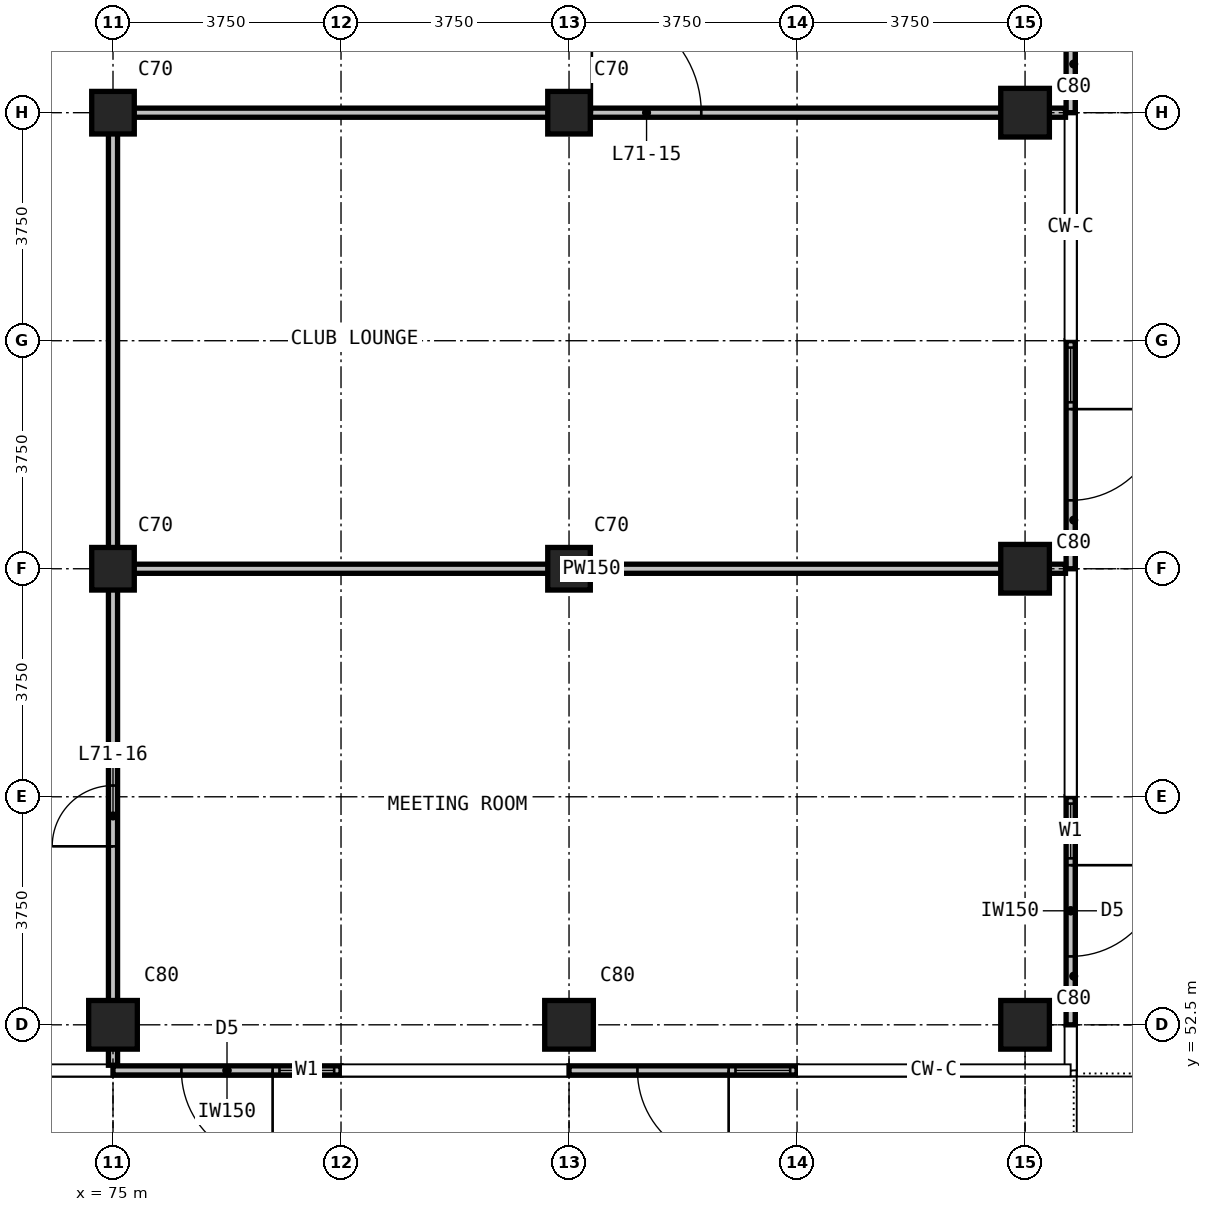
"""IFC4 building model, lengths in metres.
Left out: names, types, materials, properties, quantities, classifications, styles, units other than length and angle.
Written with IfcOpenShell. Run it as: python <this file> out.ifc"""

import sys

from ifc_helpers import new_model, si_unit, direction, frame, frame_2d, origin, origin_2d, place, context, subcontext, project, spatial, rectangle, extrude, element, fill, save


model = new_model("IFC4")
c1 = context("Model", 3, precision=1e-05, world=origin(), true_north=direction((0.0, 1.0)))
c2 = subcontext(c1, "Body", "Model", "MODEL_VIEW")
j1 = project(units=[si_unit("LENGTHUNIT", "METRE"), si_unit("PLANEANGLEUNIT", "RADIAN")], contexts=[c1])
p1 = place(None, origin())
s1 = spatial("IfcSite", under=j1, at=p1, CompositionType="ELEMENT")
p2 = place(p1, origin())
s2 = spatial("IfcBuilding", under=s1, at=p2, CompositionType="ELEMENT")
p3 = place(p2, frame((0.0, 0.0, 272.9)))
s3 = spatial("IfcBuildingStorey", under=s2, at=p3, CompositionType="ELEMENT", Elevation=272.9)
p4 = place(p3, frame((75.0, 52.5, 0.0), z_axis=(0.0, 0.0, 1.0), x_axis=(1.0, 0.0, 0.0)))
e1 = element("IfcColumn", 1, at=p4, inside=s3, PredefinedType="COLUMN", context=c2, shape_type="SweptSolid", body=[
    extrude(rectangle(XDim=0.8, YDim=0.8, at=origin_2d()), origin(), (0.0, 0.0, 1.0), 3.6),
])
for number, where, z_axis, x_axis in (
    (2, (75.0, 60.0, 0.0), (0.0, 0.0, 1.0), (1.0, 0.0, 0.0)),
    (3, (75.0, 67.5, 0.0), (0.0, 0.0, 1.0), (1.0, 0.0, 0.0)),
):
    element("IfcColumn", number, at=place(p3, frame(where, z_axis=z_axis, x_axis=x_axis)), inside=s3, PredefinedType="COLUMN", context=c2, shape_type="SweptSolid", body=[
        extrude(rectangle(XDim=0.7, YDim=0.7, at=origin_2d()), origin(), (0.0, 0.0, 1.0), 3.6),
    ])
p5 = place(p3, frame((82.5, 52.5, 0.0), z_axis=(0.0, 0.0, 1.0), x_axis=(1.0, 0.0, 0.0)))
e4 = element("IfcColumn", 4, at=p5, inside=s3, PredefinedType="COLUMN", context=c2, shape_type="SweptSolid", body=[
    extrude(rectangle(XDim=0.8, YDim=0.8, at=origin_2d()), origin(), (0.0, 0.0, 1.0), 3.6),
])
for number, where, z_axis, x_axis in (
    (5, (82.5, 60.0, 0.0), (0.0, 0.0, 1.0), (1.0, 0.0, 0.0)),
    (6, (82.5, 67.5, 0.0), (0.0, 0.0, 1.0), (1.0, 0.0, 0.0)),
):
    element("IfcColumn", number, at=place(p3, frame(where, z_axis=z_axis, x_axis=x_axis)), inside=s3, PredefinedType="COLUMN", context=c2, shape_type="SweptSolid", body=[
        extrude(rectangle(XDim=0.7, YDim=0.7, at=origin_2d()), origin(), (0.0, 0.0, 1.0), 3.6),
    ])
for number, where, z_axis, x_axis in (
    (7, (90.0, 52.5, 0.0), (0.0, 0.0, 1.0), (1.0, 0.0, 0.0)),
    (8, (90.0, 60.0, 0.0), (0.0, 0.0, 1.0), (1.0, 0.0, 0.0)),
    (9, (90.0, 67.5, 0.0), (0.0, 0.0, 1.0), (1.0, 0.0, 0.0)),
):
    element("IfcColumn", number, at=place(p3, frame(where, z_axis=z_axis, x_axis=x_axis)), inside=s3, PredefinedType="COLUMN", context=c2, shape_type="SweptSolid", body=[
        extrude(rectangle(XDim=0.8, YDim=0.8, at=origin_2d()), origin(), (0.0, 0.0, 1.0), 3.6),
    ])
p6 = place(p3, frame((90.75, 56.25, 0.0), z_axis=(0.0, 0.0, 1.0), x_axis=(0.0, -1.0, 0.0)))
e10 = element("IfcWall", 10, at=p6, inside=s3, PredefinedType="SOLIDWALL", context=c2, shape_type="SweptSolid", body=[
    extrude(rectangle(XDim=3.75, YDim=0.15, at=frame_2d((1.875, 0.0))), origin(), (0.0, 0.0, 1.0), 3.3),
])
p7 = place(p6, frame((0.113, 0.0, 0.1)))
e11 = element("IfcOpeningElement", 11, at=p7, cuts=e10, PredefinedType="OPENING", context=c2, shape_type="SweptSolid", body=[
    extrude(rectangle(XDim=0.9, YDim=2.4, at=frame_2d((0.45, 1.2))), frame((0.0, 0.085, 0.0), z_axis=(0.0, -1.0, 0.0), x_axis=(1.0, 0.0, 0.0)), (0.0, 0.0, 1.0), 0.17),
])
p8 = place(p6, frame((1.125, 0.0, 0.0)))
e12 = element("IfcOpeningElement", 12, at=p8, cuts=e10, PredefinedType="OPENING", context=c2, shape_type="SweptSolid", body=[
    extrude(rectangle(XDim=1.5, YDim=2.4, at=frame_2d((0.75, 1.2))), frame((0.0, 0.085, 0.0), z_axis=(0.0, -1.0, 0.0), x_axis=(1.0, 0.0, 0.0)), (0.0, 0.0, 1.0), 0.17),
])
p9 = place(p3, frame((90.75, 63.75, 0.0), z_axis=(0.0, 0.0, 1.0), x_axis=(0.0, -1.0, 0.0)))
e13 = element("IfcWall", 13, at=p9, inside=s3, PredefinedType="SOLIDWALL", context=c2, shape_type="SweptSolid", body=[
    extrude(rectangle(XDim=3.75, YDim=0.15, at=frame_2d((1.875, 0.0))), origin(), (0.0, 0.0, 1.0), 3.3),
])
p10 = place(p9, frame((0.113, 0.0, 0.1)))
e14 = element("IfcOpeningElement", 14, at=p10, cuts=e13, PredefinedType="OPENING", context=c2, shape_type="SweptSolid", body=[
    extrude(rectangle(XDim=0.9, YDim=2.4, at=frame_2d((0.45, 1.2))), frame((0.0, 0.085, 0.0), z_axis=(0.0, -1.0, 0.0), x_axis=(1.0, 0.0, 0.0)), (0.0, 0.0, 1.0), 0.17),
])
p11 = place(p9, frame((1.125, 0.0, 0.0)))
e15 = element("IfcOpeningElement", 15, at=p11, cuts=e13, PredefinedType="OPENING", context=c2, shape_type="SweptSolid", body=[
    extrude(rectangle(XDim=1.5, YDim=2.4, at=frame_2d((0.75, 1.2))), frame((0.0, 0.085, 0.0), z_axis=(0.0, -1.0, 0.0), x_axis=(1.0, 0.0, 0.0)), (0.0, 0.0, 1.0), 0.17),
])
p12 = place(p3, frame((90.75, 71.25, 0.0), z_axis=(0.0, 0.0, 1.0), x_axis=(0.0, -1.0, 0.0)))
e16 = element("IfcWall", 16, at=p12, inside=s3, PredefinedType="SOLIDWALL", context=c2, shape_type="SweptSolid", body=[
    extrude(rectangle(XDim=3.75, YDim=0.15, at=frame_2d((1.875, 0.0))), origin(), (0.0, 0.0, 1.0), 3.3),
])
p13 = place(p12, frame((0.113, 0.0, 0.1)))
e17 = element("IfcOpeningElement", 17, at=p13, cuts=e16, PredefinedType="OPENING", context=c2, shape_type="SweptSolid", body=[
    extrude(rectangle(XDim=0.9, YDim=2.4, at=frame_2d((0.45, 1.2))), frame((0.0, 0.085, 0.0), z_axis=(0.0, -1.0, 0.0), x_axis=(1.0, 0.0, 0.0)), (0.0, 0.0, 1.0), 0.17),
])
p14 = place(p12, frame((1.125, 0.0, 0.0)))
e18 = element("IfcOpeningElement", 18, at=p14, cuts=e16, PredefinedType="OPENING", context=c2, shape_type="SweptSolid", body=[
    extrude(rectangle(XDim=1.5, YDim=2.4, at=frame_2d((0.75, 1.2))), frame((0.0, 0.085, 0.0), z_axis=(0.0, -1.0, 0.0), x_axis=(1.0, 0.0, 0.0)), (0.0, 0.0, 1.0), 0.17),
])
p15 = place(p3, frame((78.75, 51.75, 0.0), z_axis=(0.0, 0.0, 1.0), x_axis=(-1.0, 0.0, 0.0)))
e19 = element("IfcWall", 19, at=p15, inside=s3, PredefinedType="SOLIDWALL", context=c2, shape_type="SweptSolid", body=[
    extrude(rectangle(XDim=3.75, YDim=0.15, at=frame_2d((1.875, 0.0))), origin(), (0.0, 0.0, 1.0), 3.3),
])
p16 = place(p15, frame((0.113, 0.0, 0.1)))
e20 = element("IfcOpeningElement", 20, at=p16, cuts=e19, PredefinedType="OPENING", context=c2, shape_type="SweptSolid", body=[
    extrude(rectangle(XDim=0.9, YDim=2.4, at=frame_2d((0.45, 1.2))), frame((0.0, 0.085, 0.0), z_axis=(0.0, -1.0, 0.0), x_axis=(1.0, 0.0, 0.0)), (0.0, 0.0, 1.0), 0.17),
])
p17 = place(p15, frame((1.125, 0.0, 0.0)))
e21 = element("IfcOpeningElement", 21, at=p17, cuts=e19, PredefinedType="OPENING", context=c2, shape_type="SweptSolid", body=[
    extrude(rectangle(XDim=1.5, YDim=2.4, at=frame_2d((0.75, 1.2))), frame((0.0, 0.085, 0.0), z_axis=(0.0, -1.0, 0.0), x_axis=(1.0, 0.0, 0.0)), (0.0, 0.0, 1.0), 0.17),
])
p18 = place(p3, frame((86.25, 51.75, 0.0), z_axis=(0.0, 0.0, 1.0), x_axis=(-1.0, 0.0, 0.0)))
e22 = element("IfcWall", 22, at=p18, inside=s3, PredefinedType="SOLIDWALL", context=c2, shape_type="SweptSolid", body=[
    extrude(rectangle(XDim=3.75, YDim=0.15, at=frame_2d((1.875, 0.0))), origin(), (0.0, 0.0, 1.0), 3.3),
])
p19 = place(p18, frame((0.113, 0.0, 0.1)))
e23 = element("IfcOpeningElement", 23, at=p19, cuts=e22, PredefinedType="OPENING", context=c2, shape_type="SweptSolid", body=[
    extrude(rectangle(XDim=0.9, YDim=2.4, at=frame_2d((0.45, 1.2))), frame((0.0, 0.085, 0.0), z_axis=(0.0, -1.0, 0.0), x_axis=(1.0, 0.0, 0.0)), (0.0, 0.0, 1.0), 0.17),
])
p20 = place(p18, frame((1.125, 0.0, 0.0)))
e24 = element("IfcOpeningElement", 24, at=p20, cuts=e22, PredefinedType="OPENING", context=c2, shape_type="SweptSolid", body=[
    extrude(rectangle(XDim=1.5, YDim=2.4, at=frame_2d((0.75, 1.2))), frame((0.0, 0.085, 0.0), z_axis=(0.0, -1.0, 0.0), x_axis=(1.0, 0.0, 0.0)), (0.0, 0.0, 1.0), 0.17),
])
p21 = place(p3, frame((75.075, 60.0, 0.0), z_axis=(0.0, 0.0, 1.0), x_axis=(1.0, 0.0, 0.0)))
e25 = element("IfcWall", 25, at=p21, inside=s3, PredefinedType="PARTITIONING", context=c2, shape_type="SweptSolid", body=[
    extrude(rectangle(XDim=15.59, YDim=0.15, at=frame_2d((7.795, 0.0))), origin(), (0.0, 0.0, 1.0), 3.3),
])
p22 = place(p3, frame((75.075, 67.5, 0.0), z_axis=(0.0, 0.0, 1.0), x_axis=(1.0, 0.0, 0.0)))
e26 = element("IfcWall", 26, at=p22, inside=s3, PredefinedType="PARTITIONING", context=c2, shape_type="SweptSolid", body=[
    extrude(rectangle(XDim=15.59, YDim=0.15, at=frame_2d((7.795, 0.0))), origin(), (0.0, 0.0, 1.0), 3.3),
])
p23 = place(p22, frame((7.8, 0.0, 0.0)))
e27 = element("IfcOpeningElement", 27, at=p23, cuts=e26, PredefinedType="OPENING", context=c2, shape_type="SweptSolid", body=[
    extrude(rectangle(XDim=1.8, YDim=2.2, at=frame_2d((0.9, 1.1))), frame((0.0, 0.085, 0.0), z_axis=(0.0, -1.0, 0.0), x_axis=(1.0, 0.0, 0.0)), (0.0, 0.0, 1.0), 0.17),
])
p24 = place(p3, frame((75.0, 51.835, 0.0), z_axis=(0.0, 0.0, 1.0), x_axis=(0.0, 1.0, 0.0)))
e28 = element("IfcWall", 28, at=p24, inside=s3, PredefinedType="PARTITIONING", context=c2, shape_type="SweptSolid", body=[
    extrude(rectangle(XDim=15.74, YDim=0.15, at=frame_2d((7.87, 0.0))), origin(), (0.0, 0.0, 1.0), 3.3),
])
p25 = place(p24, frame((3.6, 0.0, 0.0)))
e29 = element("IfcOpeningElement", 29, at=p25, cuts=e28, PredefinedType="OPENING", context=c2, shape_type="SweptSolid", body=[
    extrude(rectangle(XDim=1.0, YDim=2.2, at=frame_2d((0.5, 1.1))), frame((0.0, 0.085, 0.0), z_axis=(0.0, -1.0, 0.0), x_axis=(1.0, 0.0, 0.0)), (0.0, 0.0, 1.0), 0.17),
])
p26 = place(p7, origin())
e30 = element("IfcWindow", 30, at=p26, inside=s3, PartitioningType="SINGLE_PANEL", PredefinedType="WINDOW", context=c2, shape_type="SweptSolid", body=[
    extrude(rectangle(XDim=0.9, YDim=2.4, at=frame_2d((0.45, 1.2))), frame((0.0, 0.03, 0.0), z_axis=(0.0, -1.0, 0.0), x_axis=(1.0, 0.0, 0.0)), (0.0, 0.0, 1.0), 0.06),
])
fill(e11, e30)
p27 = place(p8, origin())
e31 = element("IfcDoor", 31, at=p27, inside=s3, OperationType="DOUBLE_DOOR_SINGLE_SWING", PredefinedType="DOOR", context=c2, shape_type="SweptSolid", body=[
    extrude(rectangle(XDim=1.5, YDim=2.4, at=frame_2d((0.75, 1.2))), frame((0.0, 0.025, 0.0), z_axis=(0.0, -1.0, 0.0), x_axis=(1.0, 0.0, 0.0)), (0.0, 0.0, 1.0), 0.05),
])
fill(e12, e31)
p28 = place(p10, origin())
e32 = element("IfcWindow", 32, at=p28, inside=s3, PartitioningType="SINGLE_PANEL", PredefinedType="WINDOW", context=c2, shape_type="SweptSolid", body=[
    extrude(rectangle(XDim=0.9, YDim=2.4, at=frame_2d((0.45, 1.2))), frame((0.0, 0.03, 0.0), z_axis=(0.0, -1.0, 0.0), x_axis=(1.0, 0.0, 0.0)), (0.0, 0.0, 1.0), 0.06),
])
fill(e14, e32)
p29 = place(p11, origin())
e33 = element("IfcDoor", 33, at=p29, inside=s3, OperationType="DOUBLE_DOOR_SINGLE_SWING", PredefinedType="DOOR", context=c2, shape_type="SweptSolid", body=[
    extrude(rectangle(XDim=1.5, YDim=2.4, at=frame_2d((0.75, 1.2))), frame((0.0, 0.025, 0.0), z_axis=(0.0, -1.0, 0.0), x_axis=(1.0, 0.0, 0.0)), (0.0, 0.0, 1.0), 0.05),
])
fill(e15, e33)
p30 = place(p16, origin())
e34 = element("IfcWindow", 34, at=p30, inside=s3, PartitioningType="SINGLE_PANEL", PredefinedType="WINDOW", context=c2, shape_type="SweptSolid", body=[
    extrude(rectangle(XDim=0.9, YDim=2.4, at=frame_2d((0.45, 1.2))), frame((0.0, 0.03, 0.0), z_axis=(0.0, -1.0, 0.0), x_axis=(1.0, 0.0, 0.0)), (0.0, 0.0, 1.0), 0.06),
])
fill(e20, e34)
p31 = place(p17, origin())
e35 = element("IfcDoor", 35, at=p31, inside=s3, OperationType="DOUBLE_DOOR_SINGLE_SWING", PredefinedType="DOOR", context=c2, shape_type="SweptSolid", body=[
    extrude(rectangle(XDim=1.5, YDim=2.4, at=frame_2d((0.75, 1.2))), frame((0.0, 0.025, 0.0), z_axis=(0.0, -1.0, 0.0), x_axis=(1.0, 0.0, 0.0)), (0.0, 0.0, 1.0), 0.05),
])
fill(e21, e35)
p32 = place(p19, origin())
e36 = element("IfcWindow", 36, at=p32, inside=s3, PartitioningType="SINGLE_PANEL", PredefinedType="WINDOW", context=c2, shape_type="SweptSolid", body=[
    extrude(rectangle(XDim=0.9, YDim=2.4, at=frame_2d((0.45, 1.2))), frame((0.0, 0.03, 0.0), z_axis=(0.0, -1.0, 0.0), x_axis=(1.0, 0.0, 0.0)), (0.0, 0.0, 1.0), 0.06),
])
fill(e23, e36)
p33 = place(p20, origin())
e37 = element("IfcDoor", 37, at=p33, inside=s3, OperationType="DOUBLE_DOOR_SINGLE_SWING", PredefinedType="DOOR", context=c2, shape_type="SweptSolid", body=[
    extrude(rectangle(XDim=1.5, YDim=2.4, at=frame_2d((0.75, 1.2))), frame((0.0, 0.025, 0.0), z_axis=(0.0, -1.0, 0.0), x_axis=(1.0, 0.0, 0.0)), (0.0, 0.0, 1.0), 0.05),
])
fill(e24, e37)
p34 = place(p23, origin())
e38 = element("IfcDoor", 38, at=p34, inside=s3, OperationType="DOUBLE_DOOR_SINGLE_SWING", PredefinedType="DOOR", context=c2, shape_type="SweptSolid", body=[
    extrude(rectangle(XDim=1.8, YDim=2.2, at=frame_2d((0.9, 1.1))), frame((0.0, 0.025, 0.0), z_axis=(0.0, -1.0, 0.0), x_axis=(1.0, 0.0, 0.0)), (0.0, 0.0, 1.0), 0.05),
])
fill(e27, e38)
p35 = place(p25, origin())
e39 = element("IfcDoor", 39, at=p35, inside=s3, OperationType="SINGLE_SWING_LEFT", PredefinedType="DOOR", context=c2, shape_type="SweptSolid", body=[
    extrude(rectangle(XDim=1.0, YDim=2.2, at=frame_2d((0.5, 1.1))), frame((0.0, 0.025, 0.0), z_axis=(0.0, -1.0, 0.0), x_axis=(1.0, 0.0, 0.0)), (0.0, 0.0, 1.0), 0.05),
])
fill(e29, e39)
save(model, sys.argv[1])
